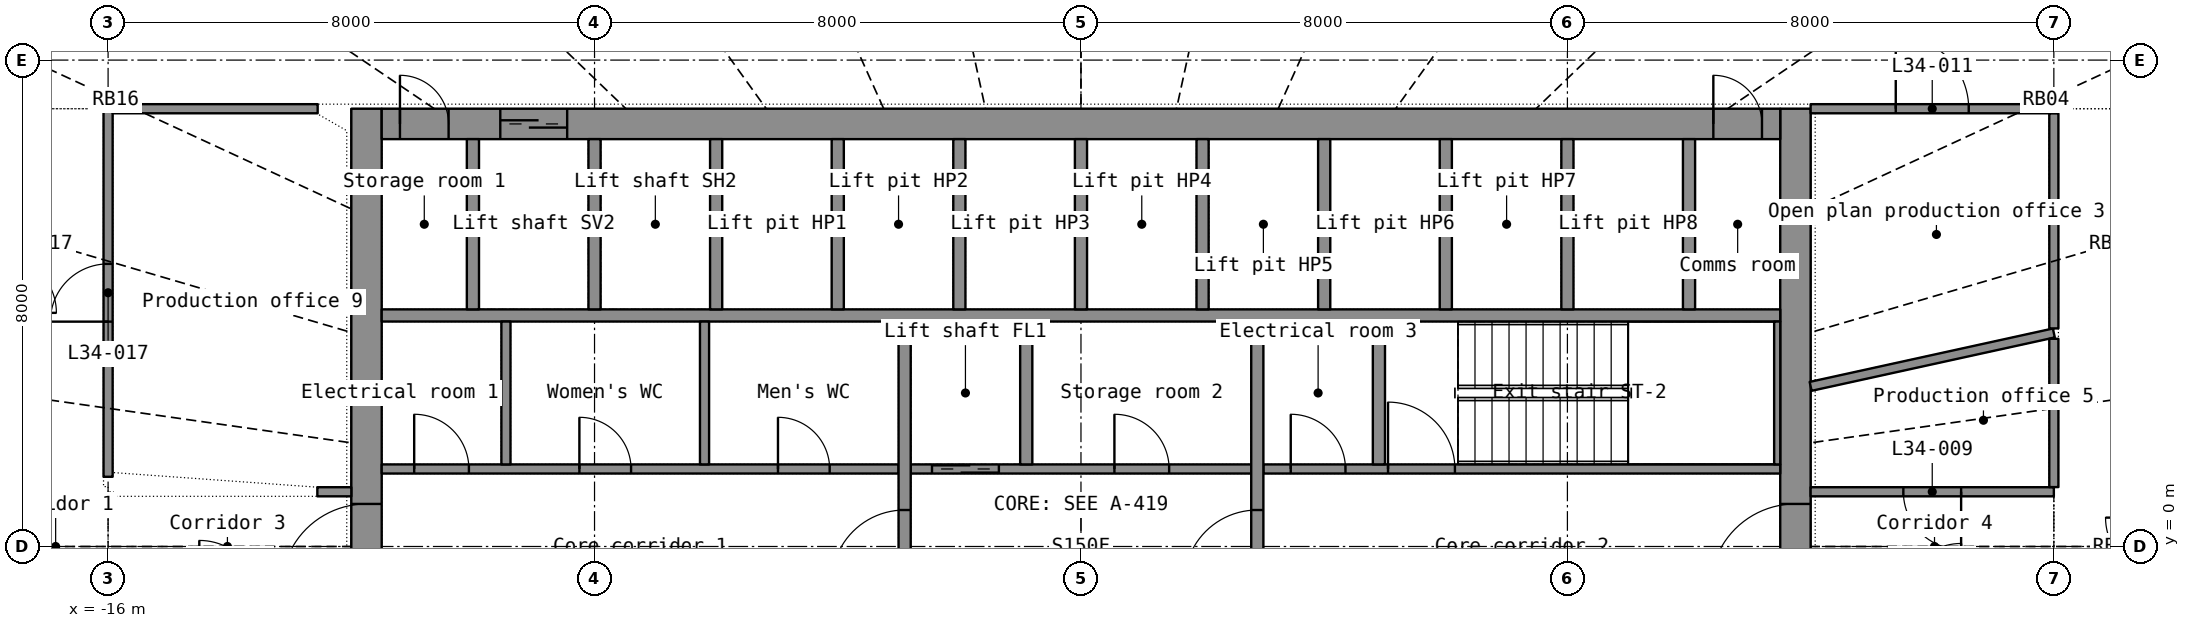
"""IFC4 building model, lengths in metres.
Left out: names, types, materials, properties, quantities, classifications, styles, units other than length and angle.
Written with IfcOpenShell. Run it as: python <this file> out.ifc"""

import sys

from ifc_helpers import new_model, si_unit, direction, frame, frame_2d, origin, place, context, subcontext, project, spatial, rectangle, extrude, element, fill, save


model = new_model("IFC4")
c1 = context("Model", 3, precision=1e-05, world=origin(), true_north=direction((0.0, 1.0)))
c2 = subcontext(c1, "Body", "Model", "MODEL_VIEW")
j1 = project(units=[si_unit("LENGTHUNIT", "METRE"), si_unit("PLANEANGLEUNIT", "RADIAN")], contexts=[c1])
p1 = place(None, origin())
s1 = spatial("IfcSite", under=j1, at=p1, CompositionType="ELEMENT")
p2 = place(p1, origin())
s2 = spatial("IfcBuilding", under=s1, at=p2, CompositionType="ELEMENT")
p3 = place(p2, frame((0.0, 0.0, 141.5)))
s3 = spatial("IfcBuildingStorey", under=s2, at=p3, CompositionType="ELEMENT", Elevation=141.5)
p4 = place(p3, frame((-11.75, -7.2, 0.0), z_axis=(0.0, 0.0, 1.0), x_axis=(0.0, 1.0, 0.0)))
e1 = element("IfcWall", 1, at=p4, inside=s3, PredefinedType="SHEAR", context=c2, shape_type="SweptSolid", body=[
    extrude(rectangle(XDim=14.4, YDim=0.5, at=frame_2d((7.2, 0.0))), origin(), (0.0, 0.0, 1.0), 3.3),
])
p5 = place(p4, frame((6.5, 0.0, 0.0)))
e2 = element("IfcOpeningElement", 2, at=p5, cuts=e1, PredefinedType="OPENING", context=c2, shape_type="SweptSolid", body=[
    extrude(rectangle(XDim=1.4, YDim=2.2, at=frame_2d((0.7, 1.1))), frame((0.0, 0.26, 0.0), z_axis=(0.0, -1.0, 0.0), x_axis=(1.0, 0.0, 0.0)), (0.0, 0.0, 1.0), 0.52),
])
p6 = place(p3, frame((11.75, -7.2, 0.0), z_axis=(0.0, 0.0, 1.0), x_axis=(0.0, 1.0, 0.0)))
e3 = element("IfcWall", 3, at=p6, inside=s3, PredefinedType="SHEAR", context=c2, shape_type="SweptSolid", body=[
    extrude(rectangle(XDim=14.4, YDim=0.5, at=frame_2d((7.2, 0.0))), origin(), (0.0, 0.0, 1.0), 3.3),
])
p7 = place(p6, frame((6.5, 0.0, 0.0)))
e4 = element("IfcOpeningElement", 4, at=p7, cuts=e3, PredefinedType="OPENING", context=c2, shape_type="SweptSolid", body=[
    extrude(rectangle(XDim=1.4, YDim=2.2, at=frame_2d((0.7, 1.1))), frame((0.0, 0.26, 0.0), z_axis=(0.0, -1.0, 0.0), x_axis=(1.0, 0.0, 0.0)), (0.0, 0.0, 1.0), 0.52),
])
p8 = place(p3, frame((-11.5, 6.95, 0.0), z_axis=(0.0, 0.0, 1.0), x_axis=(1.0, 0.0, 0.0)))
e5 = element("IfcWall", 5, at=p8, inside=s3, PredefinedType="SHEAR", context=c2, shape_type="SweptSolid", body=[
    extrude(rectangle(XDim=23.0, YDim=0.5, at=frame_2d((11.5, 0.0))), origin(), (0.0, 0.0, 1.0), 3.3),
])
p9 = place(p8, frame((1.95, 0.0, 0.0)))
e6 = element("IfcOpeningElement", 6, at=p9, cuts=e5, PredefinedType="OPENING", context=c2, shape_type="SweptSolid", body=[
    extrude(rectangle(XDim=1.1, YDim=2.2, at=frame_2d((0.55, 1.1))), frame((0.0, 0.26, 0.0), z_axis=(0.0, -1.0, 0.0), x_axis=(1.0, 0.0, 0.0)), (0.0, 0.0, 1.0), 0.52),
])
p10 = place(p8, frame((0.3, 0.0, 0.0)))
e7 = element("IfcOpeningElement", 7, at=p10, cuts=e5, PredefinedType="OPENING", context=c2, shape_type="SweptSolid", body=[
    extrude(rectangle(XDim=0.8, YDim=2.05, at=frame_2d((0.4, 1.025))), frame((0.0, 0.26, 0.0), z_axis=(0.0, -1.0, 0.0), x_axis=(1.0, 0.0, 0.0)), (0.0, 0.0, 1.0), 0.52),
])
p11 = place(p8, frame((21.9, 0.0, 0.0)))
e8 = element("IfcOpeningElement", 8, at=p11, cuts=e5, PredefinedType="OPENING", context=c2, shape_type="SweptSolid", body=[
    extrude(rectangle(XDim=0.8, YDim=2.05, at=frame_2d((0.4, 1.025))), frame((0.0, 0.26, 0.0), z_axis=(0.0, -1.0, 0.0), x_axis=(1.0, 0.0, 0.0)), (0.0, 0.0, 1.0), 0.52),
])
p12 = place(p3, frame((-11.5, 3.8, 0.0), z_axis=(0.0, 0.0, 1.0), x_axis=(1.0, 0.0, 0.0)))
e9 = element("IfcWall", 9, at=p12, inside=s3, PredefinedType="SHEAR", context=c2, shape_type="SweptSolid", body=[
    extrude(rectangle(XDim=23.0, YDim=0.2, at=frame_2d((11.5, 0.0))), origin(), (0.0, 0.0, 1.0), 3.3),
])
for number, where, z_axis, x_axis in (
    (10, (-10.0, 3.9, 0.0), (0.0, 0.0, 1.0), (0.0, 1.0, 0.0)),
    (11, (-8.0, 3.9, 0.0), (0.0, 0.0, 1.0), (0.0, 1.0, 0.0)),
    (12, (-6.0, 3.9, 0.0), (0.0, 0.0, 1.0), (0.0, 1.0, 0.0)),
    (13, (-4.0, 3.9, 0.0), (0.0, 0.0, 1.0), (0.0, 1.0, 0.0)),
    (14, (-2.0, 3.9, 0.0), (0.0, 0.0, 1.0), (0.0, 1.0, 0.0)),
    (15, (0.0, 3.9, 0.0), (0.0, 0.0, 1.0), (0.0, 1.0, 0.0)),
    (16, (2.0, 3.9, 0.0), (0.0, 0.0, 1.0), (0.0, 1.0, 0.0)),
    (17, (4.0, 3.9, 0.0), (0.0, 0.0, 1.0), (0.0, 1.0, 0.0)),
    (18, (6.0, 3.9, 0.0), (0.0, 0.0, 1.0), (0.0, 1.0, 0.0)),
    (19, (8.0, 3.9, 0.0), (0.0, 0.0, 1.0), (0.0, 1.0, 0.0)),
    (20, (10.0, 3.9, 0.0), (0.0, 0.0, 1.0), (0.0, 1.0, 0.0)),
):
    element("IfcWall", number, at=place(p3, frame(where, z_axis=z_axis, x_axis=x_axis)), inside=s3, PredefinedType="SHEAR", context=c2, shape_type="SweptSolid", body=[
        extrude(rectangle(XDim=2.8, YDim=0.2, at=frame_2d((1.4, 0.0))), origin(), (0.0, 0.0, 1.0), 3.3),
    ])
p13 = place(p3, frame((-11.5, 1.275, 0.0), z_axis=(0.0, 0.0, 1.0), x_axis=(1.0, 0.0, 0.0)))
e21 = element("IfcWall", 21, at=p13, inside=s3, PredefinedType="PARTITIONING", context=c2, shape_type="SweptSolid", body=[
    extrude(rectangle(XDim=8.5, YDim=0.15, at=frame_2d((4.25, 0.0))), origin(), (0.0, 0.0, 1.0), 3.3),
])
p14 = place(p13, frame((0.534, 0.0, 0.0)))
e22 = element("IfcOpeningElement", 22, at=p14, cuts=e21, PredefinedType="OPENING", context=c2, shape_type="SweptSolid", body=[
    extrude(rectangle(XDim=0.9, YDim=2.1, at=frame_2d((0.45, 1.05))), frame((0.0, 0.085, 0.0), z_axis=(0.0, -1.0, 0.0), x_axis=(1.0, 0.0, 0.0)), (0.0, 0.0, 1.0), 0.17),
])
p15 = place(p13, frame((3.251, 0.0, 0.0)))
e23 = element("IfcOpeningElement", 23, at=p15, cuts=e21, PredefinedType="OPENING", context=c2, shape_type="SweptSolid", body=[
    extrude(rectangle(XDim=0.85, YDim=2.1, at=frame_2d((0.425, 1.05))), frame((0.0, 0.085, 0.0), z_axis=(0.0, -1.0, 0.0), x_axis=(1.0, 0.0, 0.0)), (0.0, 0.0, 1.0), 0.17),
])
p16 = place(p13, frame((6.517, 0.0, 0.0)))
e24 = element("IfcOpeningElement", 24, at=p16, cuts=e21, PredefinedType="OPENING", context=c2, shape_type="SweptSolid", body=[
    extrude(rectangle(XDim=0.85, YDim=2.1, at=frame_2d((0.425, 1.05))), frame((0.0, 0.085, 0.0), z_axis=(0.0, -1.0, 0.0), x_axis=(1.0, 0.0, 0.0)), (0.0, 0.0, 1.0), 0.17),
])
p17 = place(p3, frame((-2.8, 1.275, 0.0), z_axis=(0.0, 0.0, 1.0), x_axis=(1.0, 0.0, 0.0)))
e25 = element("IfcWall", 25, at=p17, inside=s3, PredefinedType="SHEAR", context=c2, shape_type="SweptSolid", body=[
    extrude(rectangle(XDim=5.6, YDim=0.15, at=frame_2d((2.8, 0.0))), origin(), (0.0, 0.0, 1.0), 3.3),
])
p18 = place(p17, frame((0.35, 0.0, 0.0)))
e26 = element("IfcOpeningElement", 26, at=p18, cuts=e25, PredefinedType="OPENING", context=c2, shape_type="SweptSolid", body=[
    extrude(rectangle(XDim=1.1, YDim=2.2, at=frame_2d((0.55, 1.1))), frame((0.0, 0.085, 0.0), z_axis=(0.0, -1.0, 0.0), x_axis=(1.0, 0.0, 0.0)), (0.0, 0.0, 1.0), 0.17),
])
p19 = place(p17, frame((3.35, 0.0, 0.0)))
e27 = element("IfcOpeningElement", 27, at=p19, cuts=e25, PredefinedType="OPENING", context=c2, shape_type="SweptSolid", body=[
    extrude(rectangle(XDim=0.9, YDim=2.1, at=frame_2d((0.45, 1.05))), frame((0.0, 0.085, 0.0), z_axis=(0.0, -1.0, 0.0), x_axis=(1.0, 0.0, 0.0)), (0.0, 0.0, 1.0), 0.17),
])
p20 = place(p3, frame((3.0, 1.275, 0.0), z_axis=(0.0, 0.0, 1.0), x_axis=(1.0, 0.0, 0.0)))
e28 = element("IfcWall", 28, at=p20, inside=s3, PredefinedType="SHEAR", context=c2, shape_type="SweptSolid", body=[
    extrude(rectangle(XDim=8.5, YDim=0.15, at=frame_2d((4.25, 0.0))), origin(), (0.0, 0.0, 1.0), 3.3),
])
p21 = place(p20, frame((2.05, 0.0, 0.0)))
e29 = element("IfcOpeningElement", 29, at=p21, cuts=e28, PredefinedType="OPENING", context=c2, shape_type="SweptSolid", body=[
    extrude(rectangle(XDim=1.1, YDim=2.15, at=frame_2d((0.55, 1.075))), frame((0.0, 0.085, 0.0), z_axis=(0.0, -1.0, 0.0), x_axis=(1.0, 0.0, 0.0)), (0.0, 0.0, 1.0), 0.17),
])
p22 = place(p20, frame((0.45, 0.0, 0.0)))
e30 = element("IfcOpeningElement", 30, at=p22, cuts=e28, PredefinedType="OPENING", context=c2, shape_type="SweptSolid", body=[
    extrude(rectangle(XDim=0.9, YDim=2.1, at=frame_2d((0.45, 1.05))), frame((0.0, 0.085, 0.0), z_axis=(0.0, -1.0, 0.0), x_axis=(1.0, 0.0, 0.0)), (0.0, 0.0, 1.0), 0.17),
])
p23 = place(p3, frame((-2.9, -3.7, 0.0), z_axis=(0.0, 0.0, 1.0), x_axis=(0.0, 1.0, 0.0)))
e31 = element("IfcWall", 31, at=p23, inside=s3, PredefinedType="SHEAR", context=c2, shape_type="SweptSolid", body=[
    extrude(rectangle(XDim=7.4, YDim=0.2, at=frame_2d((3.7, 0.0))), origin(), (0.0, 0.0, 1.0), 3.3),
])
p24 = place(p23, frame((3.1, 0.0, 0.0)))
e32 = element("IfcOpeningElement", 32, at=p24, cuts=e31, PredefinedType="OPENING", context=c2, shape_type="SweptSolid", body=[
    extrude(rectangle(XDim=1.2, YDim=2.2, at=frame_2d((0.6, 1.1))), frame((0.0, 0.11, 0.0), z_axis=(0.0, -1.0, 0.0), x_axis=(1.0, 0.0, 0.0)), (0.0, 0.0, 1.0), 0.22),
])
p25 = place(p3, frame((2.9, -3.7, 0.0), z_axis=(0.0, 0.0, 1.0), x_axis=(0.0, 1.0, 0.0)))
e33 = element("IfcWall", 33, at=p25, inside=s3, PredefinedType="SHEAR", context=c2, shape_type="SweptSolid", body=[
    extrude(rectangle(XDim=7.4, YDim=0.2, at=frame_2d((3.7, 0.0))), origin(), (0.0, 0.0, 1.0), 3.3),
])
p26 = place(p25, frame((3.1, 0.0, 0.0)))
e34 = element("IfcOpeningElement", 34, at=p26, cuts=e33, PredefinedType="OPENING", context=c2, shape_type="SweptSolid", body=[
    extrude(rectangle(XDim=1.2, YDim=2.2, at=frame_2d((0.6, 1.1))), frame((0.0, 0.11, 0.0), z_axis=(0.0, -1.0, 0.0), x_axis=(1.0, 0.0, 0.0)), (0.0, 0.0, 1.0), 0.22),
])
p27 = place(p3, frame((-0.9, 1.35, 0.0), z_axis=(0.0, 0.0, 1.0), x_axis=(0.0, 1.0, 0.0)))
e35 = element("IfcWall", 35, at=p27, inside=s3, PredefinedType="SHEAR", context=c2, shape_type="SweptSolid", body=[
    extrude(rectangle(XDim=2.35, YDim=0.2, at=frame_2d((1.175, 0.0))), origin(), (0.0, 0.0, 1.0), 3.3),
])
p28 = place(p3, frame((11.45, 1.35, 0.0), z_axis=(0.0, 0.0, 1.0), x_axis=(0.0, 1.0, 0.0)))
e36 = element("IfcWall", 36, at=p28, inside=s3, PredefinedType="SHEAR", context=c2, shape_type="SweptSolid", body=[
    extrude(rectangle(XDim=2.35, YDim=0.1, at=frame_2d((1.175, 0.0))), origin(), (0.0, 0.0, 1.0), 3.3),
])
p29 = place(p3, frame((4.9, 1.35, 0.0), z_axis=(0.0, 0.0, 1.0), x_axis=(0.0, 1.0, 0.0)))
e37 = element("IfcWall", 37, at=p29, inside=s3, PredefinedType="SHEAR", context=c2, shape_type="SweptSolid", body=[
    extrude(rectangle(XDim=2.35, YDim=0.2, at=frame_2d((1.175, 0.0))), origin(), (0.0, 0.0, 1.0), 3.3),
])
for number, where, z_axis, x_axis in (
    (38, (-9.457, 1.35, 0.0), (0.0, 0.0, 1.0), (0.0, 1.0, 0.0)),
    (39, (-6.191, 1.35, 0.0), (0.0, 0.0, 1.0), (0.0, 1.0, 0.0)),
):
    element("IfcWall", number, at=place(p3, frame(where, z_axis=z_axis, x_axis=x_axis)), inside=s3, PredefinedType="PARTITIONING", context=c2, shape_type="SweptSolid", body=[
        extrude(rectangle(XDim=2.35, YDim=0.15, at=frame_2d((1.175, 0.0))), origin(), (0.0, 0.0, 1.0), 3.3),
    ])
p30 = place(p3, frame((-16.0, 1.146, 0.0), z_axis=(0.0, 0.0, 1.0), x_axis=(0.0, 1.0, 0.0)))
e40 = element("IfcWall", 40, at=p30, inside=s3, PredefinedType="PARTITIONING", context=c2, shape_type="SweptSolid", body=[
    extrude(rectangle(XDim=6.053, YDim=0.15, at=frame_2d((3.027, 0.0))), origin(), (0.0, 0.0, 1.0), 2.4),
])
p31 = place(p30, frame((2.552, 0.0, 0.0)))
e41 = element("IfcOpeningElement", 41, at=p31, cuts=e40, PredefinedType="OPENING", context=c2, shape_type="SweptSolid", body=[
    extrude(rectangle(XDim=0.95, YDim=2.15, at=frame_2d((0.475, 1.075))), frame((0.0, 0.085, 0.0), z_axis=(0.0, -1.0, 0.0), x_axis=(1.0, 0.0, 0.0)), (0.0, 0.0, 1.0), 0.17),
])
p32 = place(p3, frame((16.0, 3.512, 0.0), z_axis=(0.0, 0.0, 1.0), x_axis=(-0.976750433, -0.214379551, 0.0)))
e42 = element("IfcWall", 42, at=p32, inside=s3, PredefinedType="PARTITIONING", context=c2, shape_type="SweptSolid", body=[
    extrude(rectangle(XDim=4.095, YDim=0.15, at=frame_2d((2.048, 0.0))), origin(), (0.0, 0.0, 1.0), 2.4),
])
p33 = place(p3, frame((12.0, 7.2, 0.0), z_axis=(0.0, 0.0, 1.0), x_axis=(1.0, 0.0, 0.0)))
e43 = element("IfcWall", 43, at=p33, inside=s3, PredefinedType="PARTITIONING", context=c2, shape_type="SweptSolid", body=[
    extrude(rectangle(XDim=4.0, YDim=0.15, at=frame_2d((2.0, 0.0))), origin(), (0.0, 0.0, 1.0), 2.4),
])
p34 = place(p33, frame((1.4, 0.0, 0.0)))
e44 = element("IfcOpeningElement", 44, at=p34, cuts=e43, PredefinedType="OPENING", context=c2, shape_type="SweptSolid", body=[
    extrude(rectangle(XDim=1.2, YDim=2.2, at=frame_2d((0.6, 1.1))), frame((0.0, 0.085, 0.0), z_axis=(0.0, -1.0, 0.0), x_axis=(1.0, 0.0, 0.0)), (0.0, 0.0, 1.0), 0.17),
])
p35 = place(p3, frame((16.0, 0.9, 0.0), z_axis=(0.0, 0.0, 1.0), x_axis=(-1.0, 0.0, 0.0)))
e45 = element("IfcWall", 45, at=p35, inside=s3, PredefinedType="PARTITIONING", context=c2, shape_type="SweptSolid", body=[
    extrude(rectangle(XDim=4.0, YDim=0.15, at=frame_2d((2.0, 0.0))), origin(), (0.0, 0.0, 1.0), 2.4),
])
p36 = place(p35, frame((1.525, 0.0, 0.0)))
e46 = element("IfcOpeningElement", 46, at=p36, cuts=e45, PredefinedType="OPENING", context=c2, shape_type="SweptSolid", body=[
    extrude(rectangle(XDim=0.95, YDim=2.15, at=frame_2d((0.475, 1.075))), frame((0.0, 0.085, 0.0), z_axis=(0.0, -1.0, 0.0), x_axis=(1.0, 0.0, 0.0)), (0.0, 0.0, 1.0), 0.17),
])
p37 = place(p3, frame((16.0, 7.123, 0.0), z_axis=(0.0, 0.0, 1.0), x_axis=(0.0, -1.0, 0.0)))
e47 = element("IfcWall", 47, at=p37, inside=s3, PredefinedType="PARTITIONING", context=c2, shape_type="SweptSolid", body=[
    extrude(rectangle(XDim=3.536, YDim=0.15, at=frame_2d((1.768, 0.0))), origin(), (0.0, 0.0, 1.0), 2.4),
])
p38 = place(p3, frame((-15.923, 7.2, 0.0), z_axis=(0.0, 0.0, 1.0), x_axis=(1.0, 0.0, 0.0)))
e48 = element("IfcWall", 48, at=p38, inside=s3, PredefinedType="PARTITIONING", context=c2, shape_type="SweptSolid", body=[
    extrude(rectangle(XDim=3.37, YDim=0.15, at=frame_2d((1.685, 0.0))), origin(), (0.0, 0.0, 1.0), 2.4),
])
p39 = place(p3, frame((16.0, 3.417, 0.0), z_axis=(0.0, 0.0, 1.0), x_axis=(0.0, -1.0, 0.0)))
e49 = element("IfcWall", 49, at=p39, inside=s3, PredefinedType="PARTITIONING", context=c2, shape_type="SweptSolid", body=[
    extrude(rectangle(XDim=2.439, YDim=0.15, at=frame_2d((1.22, 0.0))), origin(), (0.0, 0.0, 1.0), 2.4),
])
p40 = place(p3, frame((-12.0, 0.9, 0.0), z_axis=(0.0, 0.0, 1.0), x_axis=(-1.0, 0.0, 0.0)))
e50 = element("IfcWall", 50, at=p40, inside=s3, PredefinedType="PARTITIONING", context=c2, shape_type="SweptSolid", body=[
    extrude(rectangle(XDim=0.559, YDim=0.15, at=frame_2d((0.279, 0.0))), origin(), (0.0, 0.0, 1.0), 2.4),
])
p41 = place(p9, origin())
e51 = element("IfcDoor", 51, at=p41, inside=s3, OperationType="DOUBLE_DOOR_SLIDING", PredefinedType="DOOR", context=c2, shape_type="SweptSolid", body=[
    extrude(rectangle(XDim=1.1, YDim=2.2, at=frame_2d((0.55, 1.1))), frame((0.0, 0.025, 0.0), z_axis=(0.0, -1.0, 0.0), x_axis=(1.0, 0.0, 0.0)), (0.0, 0.0, 1.0), 0.05),
])
fill(e6, e51)
p42 = place(p10, origin())
e52 = element("IfcDoor", 52, at=p42, inside=s3, OperationType="SINGLE_SWING_LEFT", PredefinedType="DOOR", context=c2, shape_type="SweptSolid", body=[
    extrude(rectangle(XDim=0.8, YDim=2.05, at=frame_2d((0.4, 1.025))), frame((0.0, 0.025, 0.0), z_axis=(0.0, -1.0, 0.0), x_axis=(1.0, 0.0, 0.0)), (0.0, 0.0, 1.0), 0.05),
])
fill(e7, e52)
p43 = place(p11, origin())
e53 = element("IfcDoor", 53, at=p43, inside=s3, OperationType="SINGLE_SWING_LEFT", PredefinedType="DOOR", context=c2, shape_type="SweptSolid", body=[
    extrude(rectangle(XDim=0.8, YDim=2.05, at=frame_2d((0.4, 1.025))), frame((0.0, 0.025, 0.0), z_axis=(0.0, -1.0, 0.0), x_axis=(1.0, 0.0, 0.0)), (0.0, 0.0, 1.0), 0.05),
])
fill(e8, e53)
p44 = place(p5, origin())
e54 = element("IfcDoor", 54, at=p44, inside=s3, OperationType="DOUBLE_DOOR_SINGLE_SWING", PredefinedType="DOOR", context=c2, shape_type="SweptSolid", body=[
    extrude(rectangle(XDim=1.4, YDim=2.2, at=frame_2d((0.7, 1.1))), frame((0.0, 0.025, 0.0), z_axis=(0.0, -1.0, 0.0), x_axis=(1.0, 0.0, 0.0)), (0.0, 0.0, 1.0), 0.05),
])
fill(e2, e54)
p45 = place(p7, origin())
e55 = element("IfcDoor", 55, at=p45, inside=s3, OperationType="DOUBLE_DOOR_SINGLE_SWING", PredefinedType="DOOR", context=c2, shape_type="SweptSolid", body=[
    extrude(rectangle(XDim=1.4, YDim=2.2, at=frame_2d((0.7, 1.1))), frame((0.0, 0.025, 0.0), z_axis=(0.0, -1.0, 0.0), x_axis=(1.0, 0.0, 0.0)), (0.0, 0.0, 1.0), 0.05),
])
fill(e4, e55)
p46 = place(p24, origin())
e56 = element("IfcDoor", 56, at=p46, inside=s3, OperationType="SINGLE_SWING_LEFT", PredefinedType="DOOR", context=c2, shape_type="SweptSolid", body=[
    extrude(rectangle(XDim=1.2, YDim=2.2, at=frame_2d((0.6, 1.1))), frame((0.0, 0.025, 0.0), z_axis=(0.0, -1.0, 0.0), x_axis=(1.0, 0.0, 0.0)), (0.0, 0.0, 1.0), 0.05),
])
fill(e32, e56)
p47 = place(p26, origin())
e57 = element("IfcDoor", 57, at=p47, inside=s3, OperationType="SINGLE_SWING_LEFT", PredefinedType="DOOR", context=c2, shape_type="SweptSolid", body=[
    extrude(rectangle(XDim=1.2, YDim=2.2, at=frame_2d((0.6, 1.1))), frame((0.0, 0.025, 0.0), z_axis=(0.0, -1.0, 0.0), x_axis=(1.0, 0.0, 0.0)), (0.0, 0.0, 1.0), 0.05),
])
fill(e34, e57)
p48 = place(p18, origin())
e58 = element("IfcDoor", 58, at=p48, inside=s3, OperationType="DOUBLE_DOOR_SLIDING", PredefinedType="DOOR", context=c2, shape_type="SweptSolid", body=[
    extrude(rectangle(XDim=1.1, YDim=2.2, at=frame_2d((0.55, 1.1))), frame((0.0, 0.025, 0.0), z_axis=(0.0, -1.0, 0.0), x_axis=(1.0, 0.0, 0.0)), (0.0, 0.0, 1.0), 0.05),
])
fill(e26, e58)
p49 = place(p21, origin())
e59 = element("IfcDoor", 59, at=p49, inside=s3, OperationType="SINGLE_SWING_LEFT", PredefinedType="DOOR", context=c2, shape_type="SweptSolid", body=[
    extrude(rectangle(XDim=1.1, YDim=2.15, at=frame_2d((0.55, 1.075))), frame((0.0, 0.025, 0.0), z_axis=(0.0, -1.0, 0.0), x_axis=(1.0, 0.0, 0.0)), (0.0, 0.0, 1.0), 0.05),
])
fill(e29, e59)
p50 = place(p14, origin())
e60 = element("IfcDoor", 60, at=p50, inside=s3, OperationType="SINGLE_SWING_LEFT", PredefinedType="DOOR", context=c2, shape_type="SweptSolid", body=[
    extrude(rectangle(XDim=0.9, YDim=2.1, at=frame_2d((0.45, 1.05))), frame((0.0, 0.025, 0.0), z_axis=(0.0, -1.0, 0.0), x_axis=(1.0, 0.0, 0.0)), (0.0, 0.0, 1.0), 0.05),
])
fill(e22, e60)
p51 = place(p15, origin())
e61 = element("IfcDoor", 61, at=p51, inside=s3, OperationType="SINGLE_SWING_LEFT", PredefinedType="DOOR", context=c2, shape_type="SweptSolid", body=[
    extrude(rectangle(XDim=0.85, YDim=2.1, at=frame_2d((0.425, 1.05))), frame((0.0, 0.025, 0.0), z_axis=(0.0, -1.0, 0.0), x_axis=(1.0, 0.0, 0.0)), (0.0, 0.0, 1.0), 0.05),
])
fill(e23, e61)
p52 = place(p16, origin())
e62 = element("IfcDoor", 62, at=p52, inside=s3, OperationType="SINGLE_SWING_LEFT", PredefinedType="DOOR", context=c2, shape_type="SweptSolid", body=[
    extrude(rectangle(XDim=0.85, YDim=2.1, at=frame_2d((0.425, 1.05))), frame((0.0, 0.025, 0.0), z_axis=(0.0, -1.0, 0.0), x_axis=(1.0, 0.0, 0.0)), (0.0, 0.0, 1.0), 0.05),
])
fill(e24, e62)
p53 = place(p19, origin())
e63 = element("IfcDoor", 63, at=p53, inside=s3, OperationType="SINGLE_SWING_LEFT", PredefinedType="DOOR", context=c2, shape_type="SweptSolid", body=[
    extrude(rectangle(XDim=0.9, YDim=2.1, at=frame_2d((0.45, 1.05))), frame((0.0, 0.025, 0.0), z_axis=(0.0, -1.0, 0.0), x_axis=(1.0, 0.0, 0.0)), (0.0, 0.0, 1.0), 0.05),
])
fill(e27, e63)
p54 = place(p22, origin())
e64 = element("IfcDoor", 64, at=p54, inside=s3, OperationType="SINGLE_SWING_LEFT", PredefinedType="DOOR", context=c2, shape_type="SweptSolid", body=[
    extrude(rectangle(XDim=0.9, YDim=2.1, at=frame_2d((0.45, 1.05))), frame((0.0, 0.025, 0.0), z_axis=(0.0, -1.0, 0.0), x_axis=(1.0, 0.0, 0.0)), (0.0, 0.0, 1.0), 0.05),
])
fill(e30, e64)
p55 = place(p36, origin())
e65 = element("IfcDoor", 65, at=p55, inside=s3, OperationType="SINGLE_SWING_LEFT", PredefinedType="DOOR", context=c2, shape_type="SweptSolid", body=[
    extrude(rectangle(XDim=0.95, YDim=2.15, at=frame_2d((0.475, 1.075))), frame((0.0, 0.025, 0.0), z_axis=(0.0, -1.0, 0.0), x_axis=(1.0, 0.0, 0.0)), (0.0, 0.0, 1.0), 0.05),
])
fill(e46, e65)
p56 = place(p34, origin())
e66 = element("IfcDoor", 66, at=p56, inside=s3, OperationType="DOUBLE_DOOR_SINGLE_SWING", PredefinedType="DOOR", context=c2, shape_type="SweptSolid", body=[
    extrude(rectangle(XDim=1.2, YDim=2.2, at=frame_2d((0.6, 1.1))), frame((0.0, 0.025, 0.0), z_axis=(0.0, -1.0, 0.0), x_axis=(1.0, 0.0, 0.0)), (0.0, 0.0, 1.0), 0.05),
])
fill(e44, e66)
p57 = place(p31, origin())
e67 = element("IfcDoor", 67, at=p57, inside=s3, OperationType="SINGLE_SWING_LEFT", PredefinedType="DOOR", context=c2, shape_type="SweptSolid", body=[
    extrude(rectangle(XDim=0.95, YDim=2.15, at=frame_2d((0.475, 1.075))), frame((0.0, 0.025, 0.0), z_axis=(0.0, -1.0, 0.0), x_axis=(1.0, 0.0, 0.0)), (0.0, 0.0, 1.0), 0.05),
])
fill(e41, e67)
save(model, sys.argv[1])
